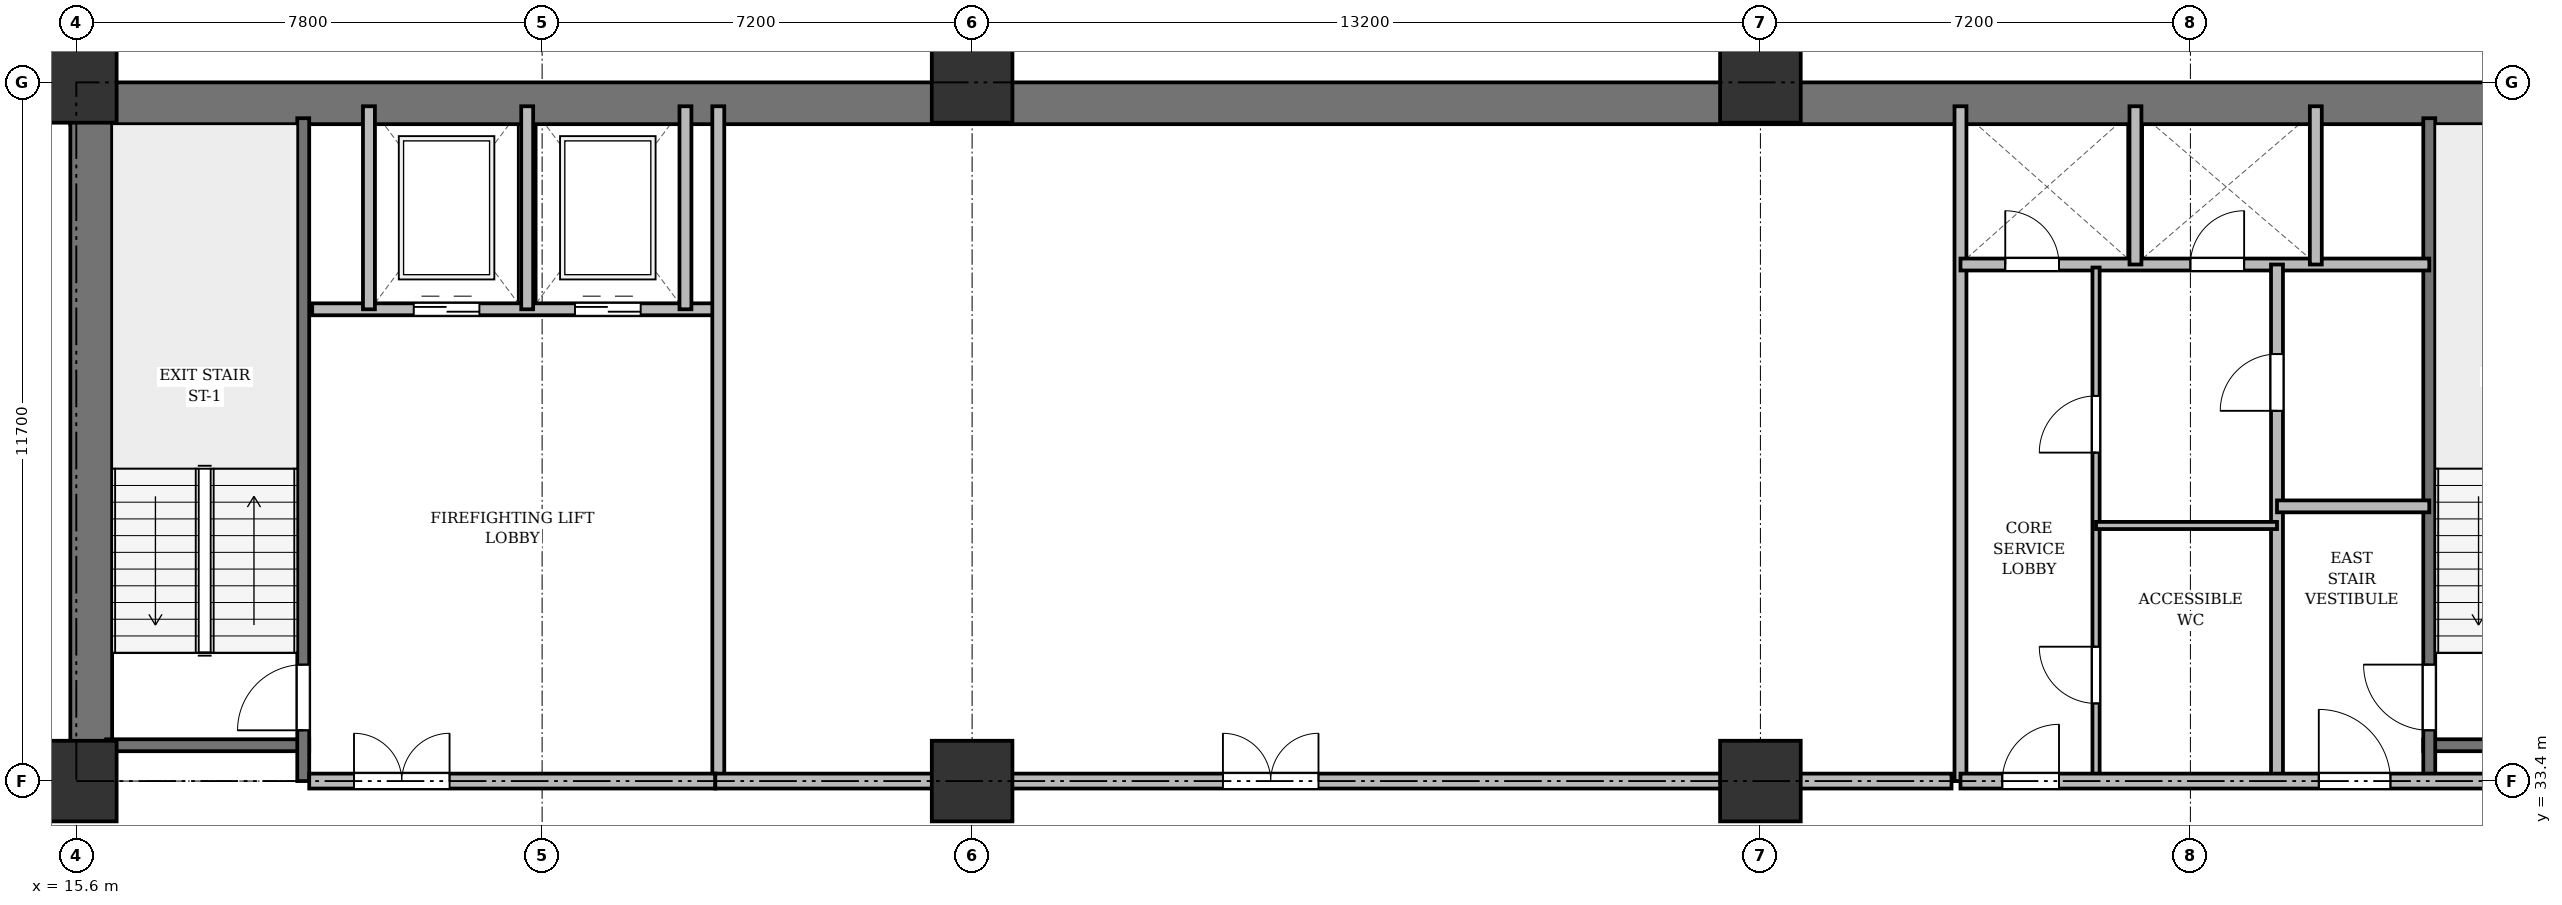
"""IFC4 building model, lengths in metres.
Left out: names, types, materials, properties, quantities, classifications, styles, units other than length and angle.
Written with IfcOpenShell. Run it as: python <this file> out.ifc"""

import sys

from ifc_helpers import new_model, si_unit, direction, frame, frame_2d, origin, origin_2d, place, context, subcontext, project, spatial, rectangle, extrude, source, transform, mapped, element, fill, save


model = new_model("IFC4")
c1 = context("Model", 3, precision=1e-05, world=origin(), true_north=direction((0.0, 1.0)))
c2 = subcontext(c1, "Body", "Model", "MODEL_VIEW")
j1 = project(units=[si_unit("LENGTHUNIT", "METRE"), si_unit("PLANEANGLEUNIT", "RADIAN")], contexts=[c1])
p1 = place(None, origin())
s1 = spatial("IfcSite", under=j1, at=p1, CompositionType="ELEMENT")
p2 = place(p1, origin())
s2 = spatial("IfcBuilding", under=s1, at=p2, CompositionType="ELEMENT")
p3 = place(p2, frame((0.0, 0.0, -4.3)))
s3 = spatial("IfcBuildingStorey", under=s2, at=p3, CompositionType="ELEMENT", Elevation=-4.3)
m1 = source(origin(), c2, "Body", "SweptSolid", [
    extrude(rectangle(XDim=1.35, YDim=1.35, at=origin_2d()), origin(), (0.0, 0.0, 1.0), 4.3),
])
for number, where, z_axis, x_axis in (
    (1, (15.6, 33.4, 0.0), (0.0, 0.0, 1.0), (1.0, 0.0, 0.0)),
    (2, (15.6, 45.1, 0.0), (0.0, 0.0, 1.0), (1.0, 0.0, 0.0)),
    (3, (30.6, 33.4, 0.0), (0.0, 0.0, 1.0), (1.0, 0.0, 0.0)),
    (4, (30.6, 45.1, 0.0), (0.0, 0.0, 1.0), (1.0, 0.0, 0.0)),
    (5, (43.8, 33.4, 0.0), (0.0, 0.0, 1.0), (1.0, 0.0, 0.0)),
    (6, (43.8, 45.1, 0.0), (0.0, 0.0, 1.0), (1.0, 0.0, 0.0)),
):
    element("IfcColumn", number, at=place(p3, frame(where, z_axis=z_axis, x_axis=x_axis)), inside=s3, PredefinedType="COLUMN", context=c2, shape_type="MappedRepresentation", body=[
        mapped(m1, transform((0.0, 0.0, 0.0), x_axis=(1.0, 0.0, 0.0), y_axis=(0.0, 1.0, 0.0), z_axis=(0.0, 0.0, 1.0), scale=1.0)),
    ])
p4 = place(p3, frame((15.5, 44.75, 0.0), z_axis=(0.0, 0.0, 1.0), x_axis=(1.0, 0.0, 0.0)))
e7 = element("IfcWall", 7, at=p4, inside=s3, PredefinedType="SHEAR", context=c2, shape_type="SweptSolid", body=[
    extrude(rectangle(XDim=43.4, YDim=0.7, at=frame_2d((21.7, 0.0))), origin(), (0.0, 0.0, 1.0), 3.94),
])
p5 = place(p3, frame((15.85, 33.4, 0.0), z_axis=(0.0, 0.0, 1.0), x_axis=(0.0, 1.0, 0.0)))
e8 = element("IfcWall", 8, at=p5, inside=s3, PredefinedType="SHEAR", context=c2, shape_type="SweptSolid", body=[
    extrude(rectangle(XDim=11.7, YDim=0.7, at=frame_2d((5.85, 0.0))), origin(), (0.0, 0.0, 1.0), 3.94),
])
p6 = place(p3, frame((16.1, 34.0, 0.0), z_axis=(0.0, 0.0, 1.0), x_axis=(1.0, 0.0, 0.0)))
e9 = element("IfcWall", 9, at=p6, inside=s3, PredefinedType="SHEAR", context=c2, shape_type="SweptSolid", body=[
    extrude(rectangle(XDim=3.4, YDim=0.2, at=frame_2d((1.7, 0.0))), origin(), (0.0, 0.0, 1.0), 3.94),
])
p7 = place(p3, frame((19.4, 33.4, 0.0), z_axis=(0.0, 0.0, 1.0), x_axis=(0.0, 1.0, 0.0)))
e10 = element("IfcWall", 10, at=p7, inside=s3, PredefinedType="SHEAR", context=c2, shape_type="SweptSolid", body=[
    extrude(rectangle(XDim=11.1, YDim=0.2, at=frame_2d((5.55, 0.0))), origin(), (0.0, 0.0, 1.0), 3.94),
])
p8 = place(p7, frame((0.85, 0.0, 0.0)))
e11 = element("IfcOpeningElement", 11, at=p8, cuts=e10, PredefinedType="OPENING", context=c2, shape_type="SweptSolid", body=[
    extrude(rectangle(XDim=1.1, YDim=2.15, at=frame_2d((0.55, 1.075))), frame((0.0, 0.11, 0.0), z_axis=(0.0, -1.0, 0.0), x_axis=(1.0, 0.0, 0.0)), (0.0, 0.0, 1.0), 0.22),
])
p9 = place(p3, frame((54.9, 34.0, 0.0), z_axis=(0.0, 0.0, 1.0), x_axis=(1.0, 0.0, 0.0)))
e12 = element("IfcWall", 12, at=p9, inside=s3, PredefinedType="SHEAR", context=c2, shape_type="SweptSolid", body=[
    extrude(rectangle(XDim=3.4, YDim=0.2, at=frame_2d((1.7, 0.0))), origin(), (0.0, 0.0, 1.0), 3.94),
])
p10 = place(p3, frame((55.0, 33.4, 0.0), z_axis=(0.0, 0.0, 1.0), x_axis=(0.0, 1.0, 0.0)))
e13 = element("IfcWall", 13, at=p10, inside=s3, PredefinedType="SHEAR", context=c2, shape_type="SweptSolid", body=[
    extrude(rectangle(XDim=11.1, YDim=0.2, at=frame_2d((5.55, 0.0))), origin(), (0.0, 0.0, 1.0), 3.94),
])
p11 = place(p10, frame((0.85, 0.0, 0.0)))
e14 = element("IfcOpeningElement", 14, at=p11, cuts=e13, PredefinedType="OPENING", context=c2, shape_type="SweptSolid", body=[
    extrude(rectangle(XDim=1.1, YDim=2.15, at=frame_2d((0.55, 1.075))), frame((0.0, 0.11, 0.0), z_axis=(0.0, -1.0, 0.0), x_axis=(1.0, 0.0, 0.0)), (0.0, 0.0, 1.0), 0.22),
])
p12 = place(p3, frame((19.55, 41.3, 0.0), z_axis=(0.0, 0.0, 1.0), x_axis=(1.0, 0.0, 0.0)))
e15 = element("IfcWall", 15, at=p12, inside=s3, PredefinedType="SOLIDWALL", context=c2, shape_type="SweptSolid", body=[
    extrude(rectangle(XDim=6.75, YDim=0.2, at=frame_2d((3.375, 0.0))), origin(), (0.0, 0.0, 1.0), 3.94),
])
p13 = place(p12, frame((1.7, 0.0, 0.0)))
e16 = element("IfcOpeningElement", 16, at=p13, cuts=e15, PredefinedType="OPENING", context=c2, shape_type="SweptSolid", body=[
    extrude(rectangle(XDim=1.1, YDim=2.15, at=frame_2d((0.55, 1.075))), frame((0.0, 0.11, 0.0), z_axis=(0.0, -1.0, 0.0), x_axis=(1.0, 0.0, 0.0)), (0.0, 0.0, 1.0), 0.22),
])
p14 = place(p12, frame((4.4, 0.0, 0.0)))
e17 = element("IfcOpeningElement", 17, at=p14, cuts=e15, PredefinedType="OPENING", context=c2, shape_type="SweptSolid", body=[
    extrude(rectangle(XDim=1.1, YDim=2.15, at=frame_2d((0.55, 1.075))), frame((0.0, 0.11, 0.0), z_axis=(0.0, -1.0, 0.0), x_axis=(1.0, 0.0, 0.0)), (0.0, 0.0, 1.0), 0.22),
])
for number, where, z_axis, x_axis in (
    (18, (20.5, 41.3, 0.0), (0.0, 0.0, 1.0), (0.0, 1.0, 0.0)),
    (19, (23.15, 41.3, 0.0), (0.0, 0.0, 1.0), (0.0, 1.0, 0.0)),
    (20, (25.8, 41.3, 0.0), (0.0, 0.0, 1.0), (0.0, 1.0, 0.0)),
):
    element("IfcWall", number, at=place(p3, frame(where, z_axis=z_axis, x_axis=x_axis)), inside=s3, PredefinedType="SOLIDWALL", context=c2, shape_type="SweptSolid", body=[
        extrude(rectangle(XDim=3.4, YDim=0.2, at=frame_2d((1.7, 0.0))), origin(), (0.0, 0.0, 1.0), 3.94),
    ])
p15 = place(p3, frame((26.35, 33.4, 0.0), z_axis=(0.0, 0.0, 1.0), x_axis=(0.0, 1.0, 0.0)))
e21 = element("IfcWall", 21, at=p15, inside=s3, PredefinedType="SOLIDWALL", context=c2, shape_type="SweptSolid", body=[
    extrude(rectangle(XDim=11.3, YDim=0.2, at=frame_2d((5.65, 0.0))), origin(), (0.0, 0.0, 1.0), 3.24),
])
p16 = place(p3, frame((19.5, 33.4, 0.0), z_axis=(0.0, 0.0, 1.0), x_axis=(1.0, 0.0, 0.0)))
e22 = element("IfcWall", 22, at=p16, inside=s3, PredefinedType="PARTITIONING", context=c2, shape_type="SweptSolid", body=[
    extrude(rectangle(XDim=6.8, YDim=0.25, at=frame_2d((3.4, 0.0))), origin(), (0.0, 0.0, 1.0), 3.24),
])
p17 = place(p16, frame((0.75, 0.0, 0.0)))
e23 = element("IfcOpeningElement", 23, at=p17, cuts=e22, PredefinedType="OPENING", context=c2, shape_type="SweptSolid", body=[
    extrude(rectangle(XDim=1.6, YDim=2.2, at=frame_2d((0.8, 1.1))), frame((0.0, 0.135, 0.0), z_axis=(0.0, -1.0, 0.0), x_axis=(1.0, 0.0, 0.0)), (0.0, 0.0, 1.0), 0.27),
])
p18 = place(p3, frame((47.15, 33.4, 0.0), z_axis=(0.0, 0.0, 1.0), x_axis=(0.0, 1.0, 0.0)))
e24 = element("IfcWall", 24, at=p18, inside=s3, PredefinedType="SOLIDWALL", context=c2, shape_type="SweptSolid", body=[
    extrude(rectangle(XDim=11.3, YDim=0.2, at=frame_2d((5.65, 0.0))), origin(), (0.0, 0.0, 1.0), 3.24),
])
p19 = place(p3, frame((26.3, 33.4, 0.0), z_axis=(0.0, 0.0, 1.0), x_axis=(1.0, 0.0, 0.0)))
e25 = element("IfcWall", 25, at=p19, inside=s3, PredefinedType="PARTITIONING", context=c2, shape_type="SweptSolid", body=[
    extrude(rectangle(XDim=20.7, YDim=0.25, at=frame_2d((10.35, 0.0))), origin(), (0.0, 0.0, 1.0), 3.24),
])
p20 = place(p19, frame((8.5, 0.0, 0.0)))
e26 = element("IfcOpeningElement", 26, at=p20, cuts=e25, PredefinedType="OPENING", context=c2, shape_type="SweptSolid", body=[
    extrude(rectangle(XDim=1.6, YDim=2.2, at=frame_2d((0.8, 1.1))), frame((0.0, 0.135, 0.0), z_axis=(0.0, -1.0, 0.0), x_axis=(1.0, 0.0, 0.0)), (0.0, 0.0, 1.0), 0.27),
])
p21 = place(p3, frame((47.15, 42.05, 0.0), z_axis=(0.0, 0.0, 1.0), x_axis=(1.0, 0.0, 0.0)))
e27 = element("IfcWall", 27, at=p21, inside=s3, PredefinedType="SOLIDWALL", context=c2, shape_type="SweptSolid", body=[
    extrude(rectangle(XDim=7.85, YDim=0.2, at=frame_2d((3.925, 0.0))), origin(), (0.0, 0.0, 1.0), 3.94),
])
p22 = place(p21, frame((0.75, 0.0, 0.0)))
e28 = element("IfcOpeningElement", 28, at=p22, cuts=e27, PredefinedType="OPENING", context=c2, shape_type="SweptSolid", body=[
    extrude(rectangle(XDim=0.9, YDim=2.1, at=frame_2d((0.45, 1.05))), frame((0.0, 0.11, 0.0), z_axis=(0.0, -1.0, 0.0), x_axis=(1.0, 0.0, 0.0)), (0.0, 0.0, 1.0), 0.22),
])
p23 = place(p21, frame((3.85, 0.0, 0.0)))
e29 = element("IfcOpeningElement", 29, at=p23, cuts=e27, PredefinedType="OPENING", context=c2, shape_type="SweptSolid", body=[
    extrude(rectangle(XDim=0.9, YDim=2.1, at=frame_2d((0.45, 1.05))), frame((0.0, 0.11, 0.0), z_axis=(0.0, -1.0, 0.0), x_axis=(1.0, 0.0, 0.0)), (0.0, 0.0, 1.0), 0.22),
])
for number, where, z_axis, x_axis in (
    (30, (50.08, 42.05, 0.0), (0.0, 0.0, 1.0), (0.0, 1.0, 0.0)),
    (31, (53.1, 42.05, 0.0), (0.0, 0.0, 1.0), (0.0, 1.0, 0.0)),
):
    element("IfcWall", number, at=place(p3, frame(where, z_axis=z_axis, x_axis=x_axis)), inside=s3, PredefinedType="SOLIDWALL", context=c2, shape_type="SweptSolid", body=[
        extrude(rectangle(XDim=2.65, YDim=0.2, at=frame_2d((1.325, 0.0))), origin(), (0.0, 0.0, 1.0), 3.94),
    ])
p24 = place(p3, frame((52.45, 33.4, 0.0), z_axis=(0.0, 0.0, 1.0), x_axis=(0.0, 1.0, 0.0)))
e32 = element("IfcWall", 32, at=p24, inside=s3, PredefinedType="PARTITIONING", context=c2, shape_type="SweptSolid", body=[
    extrude(rectangle(XDim=8.65, YDim=0.2, at=frame_2d((4.325, 0.0))), origin(), (0.0, 0.0, 1.0), 3.24),
])
p25 = place(p24, frame((6.2, 0.0, 0.0)))
e33 = element("IfcOpeningElement", 33, at=p25, cuts=e32, PredefinedType="OPENING", context=c2, shape_type="SweptSolid", body=[
    extrude(rectangle(XDim=0.95, YDim=2.15, at=frame_2d((0.475, 1.075))), frame((0.0, 0.11, 0.0), z_axis=(0.0, -1.0, 0.0), x_axis=(1.0, 0.0, 0.0)), (0.0, 0.0, 1.0), 0.22),
])
p26 = place(p3, frame((52.45, 38.0, 0.0), z_axis=(0.0, 0.0, 1.0), x_axis=(1.0, 0.0, 0.0)))
e34 = element("IfcWall", 34, at=p26, inside=s3, PredefinedType="PARTITIONING", context=c2, shape_type="SweptSolid", body=[
    extrude(rectangle(XDim=2.55, YDim=0.2, at=frame_2d((1.275, 0.0))), origin(), (0.0, 0.0, 1.0), 3.94),
])
p27 = place(p3, frame((49.42, 33.4, 0.0), z_axis=(0.0, 0.0, 1.0), x_axis=(0.0, 1.0, 0.0)))
e35 = element("IfcWall", 35, at=p27, inside=s3, PredefinedType="PARTITIONING", context=c2, shape_type="SweptSolid", body=[
    extrude(rectangle(XDim=8.6, YDim=0.12, at=frame_2d((4.3, 0.0))), origin(), (0.0, 0.0, 1.0), 3.24),
])
p28 = place(p27, frame((1.3, 0.0, 0.0)))
e36 = element("IfcOpeningElement", 36, at=p28, cuts=e35, PredefinedType="OPENING", context=c2, shape_type="SweptSolid", body=[
    extrude(rectangle(XDim=0.95, YDim=2.15, at=frame_2d((0.475, 1.075))), frame((0.0, 0.07, 0.0), z_axis=(0.0, -1.0, 0.0), x_axis=(1.0, 0.0, 0.0)), (0.0, 0.0, 1.0), 0.14),
])
p29 = place(p27, frame((5.5, 0.0, 0.0)))
e37 = element("IfcOpeningElement", 37, at=p29, cuts=e35, PredefinedType="OPENING", context=c2, shape_type="SweptSolid", body=[
    extrude(rectangle(XDim=0.95, YDim=2.15, at=frame_2d((0.475, 1.075))), frame((0.0, 0.07, 0.0), z_axis=(0.0, -1.0, 0.0), x_axis=(1.0, 0.0, 0.0)), (0.0, 0.0, 1.0), 0.14),
])
p30 = place(p3, frame((49.42, 37.68, 0.0), z_axis=(0.0, 0.0, 1.0), x_axis=(1.0, 0.0, 0.0)))
e38 = element("IfcWall", 38, at=p30, inside=s3, PredefinedType="PARTITIONING", context=c2, shape_type="SweptSolid", body=[
    extrude(rectangle(XDim=3.03, YDim=0.12, at=frame_2d((1.515, 0.0))), origin(), (0.0, 0.0, 1.0), 3.94),
])
p31 = place(p3, frame((47.15, 33.4, 0.0), z_axis=(0.0, 0.0, 1.0), x_axis=(1.0, 0.0, 0.0)))
e39 = element("IfcWall", 39, at=p31, inside=s3, PredefinedType="PARTITIONING", context=c2, shape_type="SweptSolid", body=[
    extrude(rectangle(XDim=11.15, YDim=0.25, at=frame_2d((5.575, 0.0))), origin(), (0.0, 0.0, 1.0), 3.24),
])
p32 = place(p31, frame((0.7, 0.0, 0.0)))
e40 = element("IfcOpeningElement", 40, at=p32, cuts=e39, PredefinedType="OPENING", context=c2, shape_type="SweptSolid", body=[
    extrude(rectangle(XDim=0.95, YDim=2.15, at=frame_2d((0.475, 1.075))), frame((0.0, 0.135, 0.0), z_axis=(0.0, -1.0, 0.0), x_axis=(1.0, 0.0, 0.0)), (0.0, 0.0, 1.0), 0.27),
])
p33 = place(p31, frame((6.0, 0.0, 0.0)))
e41 = element("IfcOpeningElement", 41, at=p33, cuts=e39, PredefinedType="OPENING", context=c2, shape_type="SweptSolid", body=[
    extrude(rectangle(XDim=1.2, YDim=2.15, at=frame_2d((0.6, 1.075))), frame((0.0, 0.135, 0.0), z_axis=(0.0, -1.0, 0.0), x_axis=(1.0, 0.0, 0.0)), (0.0, 0.0, 1.0), 0.27),
])
m2 = source(origin(), c2, "Body", "SweptSolid", [
    extrude(rectangle(XDim=1.1, YDim=2.15, at=frame_2d((0.55, 1.075))), frame((0.0, 0.025, 0.0), z_axis=(0.0, -1.0, 0.0), x_axis=(1.0, 0.0, 0.0)), (0.0, 0.0, 1.0), 0.05),
])
p34 = place(p8, origin())
e42 = element("IfcDoor", 42, at=p34, inside=s3, OperationType="SINGLE_SWING_LEFT", PredefinedType="DOOR", context=c2, shape_type="MappedRepresentation", body=[
    mapped(m2, transform((0.0, 0.0, 0.0), x_axis=(1.0, 0.0, 0.0), y_axis=(0.0, 1.0, 0.0), z_axis=(0.0, 0.0, 1.0), scale=1.0)),
])
fill(e11, e42)
p35 = place(p11, origin())
e43 = element("IfcDoor", 43, at=p35, inside=s3, OperationType="SINGLE_SWING_RIGHT", PredefinedType="DOOR", context=c2, shape_type="MappedRepresentation", body=[
    mapped(m2, transform((0.0, 0.0, 0.0), x_axis=(1.0, 0.0, 0.0), y_axis=(0.0, 1.0, 0.0), z_axis=(0.0, 0.0, 1.0), scale=1.0)),
])
fill(e14, e43)
p36 = place(p13, origin())
e44 = element("IfcDoor", 44, at=p36, inside=s3, OperationType="DOUBLE_DOOR_SLIDING", PredefinedType="DOOR", context=c2, shape_type="MappedRepresentation", body=[
    mapped(m2, transform((0.0, 0.0, 0.0), x_axis=(1.0, 0.0, 0.0), y_axis=(0.0, 1.0, 0.0), z_axis=(0.0, 0.0, 1.0), scale=1.0)),
])
fill(e16, e44)
p37 = place(p14, origin())
e45 = element("IfcDoor", 45, at=p37, inside=s3, OperationType="DOUBLE_DOOR_SLIDING", PredefinedType="DOOR", context=c2, shape_type="MappedRepresentation", body=[
    mapped(m2, transform((0.0, 0.0, 0.0), x_axis=(1.0, 0.0, 0.0), y_axis=(0.0, 1.0, 0.0), z_axis=(0.0, 0.0, 1.0), scale=1.0)),
])
fill(e17, e45)
m3 = source(origin(), c2, "Body", "SweptSolid", [
    extrude(rectangle(XDim=1.6, YDim=2.2, at=frame_2d((0.8, 1.1))), frame((0.0, 0.025, 0.0), z_axis=(0.0, -1.0, 0.0), x_axis=(1.0, 0.0, 0.0)), (0.0, 0.0, 1.0), 0.05),
])
p38 = place(p17, origin())
e46 = element("IfcDoor", 46, at=p38, inside=s3, OperationType="DOUBLE_DOOR_SINGLE_SWING", PredefinedType="DOOR", context=c2, shape_type="MappedRepresentation", body=[
    mapped(m3, transform((0.0, 0.0, 0.0), x_axis=(1.0, 0.0, 0.0), y_axis=(0.0, 1.0, 0.0), z_axis=(0.0, 0.0, 1.0), scale=1.0)),
])
fill(e23, e46)
p39 = place(p20, origin())
e47 = element("IfcDoor", 47, at=p39, inside=s3, OperationType="DOUBLE_DOOR_SINGLE_SWING", PredefinedType="DOOR", context=c2, shape_type="MappedRepresentation", body=[
    mapped(m3, transform((0.0, 0.0, 0.0), x_axis=(1.0, 0.0, 0.0), y_axis=(0.0, 1.0, 0.0), z_axis=(0.0, 0.0, 1.0), scale=1.0)),
])
fill(e26, e47)
m4 = source(origin(), c2, "Body", "SweptSolid", [
    extrude(rectangle(XDim=0.9, YDim=2.1, at=frame_2d((0.45, 1.05))), frame((0.0, 0.025, 0.0), z_axis=(0.0, -1.0, 0.0), x_axis=(1.0, 0.0, 0.0)), (0.0, 0.0, 1.0), 0.05),
])
p40 = place(p22, origin())
e48 = element("IfcDoor", 48, at=p40, inside=s3, OperationType="SINGLE_SWING_LEFT", PredefinedType="DOOR", context=c2, shape_type="MappedRepresentation", body=[
    mapped(m4, transform((0.0, 0.0, 0.0), x_axis=(1.0, 0.0, 0.0), y_axis=(0.0, 1.0, 0.0), z_axis=(0.0, 0.0, 1.0), scale=1.0)),
])
fill(e28, e48)
p41 = place(p23, origin())
e49 = element("IfcDoor", 49, at=p41, inside=s3, OperationType="SINGLE_SWING_RIGHT", PredefinedType="DOOR", context=c2, shape_type="MappedRepresentation", body=[
    mapped(m4, transform((0.0, 0.0, 0.0), x_axis=(1.0, 0.0, 0.0), y_axis=(0.0, 1.0, 0.0), z_axis=(0.0, 0.0, 1.0), scale=1.0)),
])
fill(e29, e49)
m5 = source(origin(), c2, "Body", "SweptSolid", [
    extrude(rectangle(XDim=0.95, YDim=2.15, at=frame_2d((0.475, 1.075))), frame((0.0, 0.025, 0.0), z_axis=(0.0, -1.0, 0.0), x_axis=(1.0, 0.0, 0.0)), (0.0, 0.0, 1.0), 0.05),
])
p42 = place(p25, origin())
e50 = element("IfcDoor", 50, at=p42, inside=s3, OperationType="SINGLE_SWING_LEFT", PredefinedType="DOOR", context=c2, shape_type="MappedRepresentation", body=[
    mapped(m5, transform((0.0, 0.0, 0.0), x_axis=(1.0, 0.0, 0.0), y_axis=(0.0, 1.0, 0.0), z_axis=(0.0, 0.0, 1.0), scale=1.0)),
])
fill(e33, e50)
p43 = place(p28, origin())
e51 = element("IfcDoor", 51, at=p43, inside=s3, OperationType="SINGLE_SWING_RIGHT", PredefinedType="DOOR", context=c2, shape_type="MappedRepresentation", body=[
    mapped(m5, transform((0.0, 0.0, 0.0), x_axis=(1.0, 0.0, 0.0), y_axis=(0.0, 1.0, 0.0), z_axis=(0.0, 0.0, 1.0), scale=1.0)),
])
fill(e36, e51)
p44 = place(p29, origin())
e52 = element("IfcDoor", 52, at=p44, inside=s3, OperationType="SINGLE_SWING_LEFT", PredefinedType="DOOR", context=c2, shape_type="MappedRepresentation", body=[
    mapped(m5, transform((0.0, 0.0, 0.0), x_axis=(1.0, 0.0, 0.0), y_axis=(0.0, 1.0, 0.0), z_axis=(0.0, 0.0, 1.0), scale=1.0)),
])
fill(e37, e52)
p45 = place(p32, origin())
e53 = element("IfcDoor", 53, at=p45, inside=s3, OperationType="SINGLE_SWING_RIGHT", PredefinedType="DOOR", context=c2, shape_type="MappedRepresentation", body=[
    mapped(m5, transform((0.0, 0.0, 0.0), x_axis=(1.0, 0.0, 0.0), y_axis=(0.0, 1.0, 0.0), z_axis=(0.0, 0.0, 1.0), scale=1.0)),
])
fill(e40, e53)
m6 = source(origin(), c2, "Body", "SweptSolid", [
    extrude(rectangle(XDim=1.2, YDim=2.15, at=frame_2d((0.6, 1.075))), frame((0.0, 0.025, 0.0), z_axis=(0.0, -1.0, 0.0), x_axis=(1.0, 0.0, 0.0)), (0.0, 0.0, 1.0), 0.05),
])
p46 = place(p33, origin())
e54 = element("IfcDoor", 54, at=p46, inside=s3, OperationType="SINGLE_SWING_LEFT", PredefinedType="DOOR", context=c2, shape_type="MappedRepresentation", body=[
    mapped(m6, transform((0.0, 0.0, 0.0), x_axis=(1.0, 0.0, 0.0), y_axis=(0.0, 1.0, 0.0), z_axis=(0.0, 0.0, 1.0), scale=1.0)),
])
fill(e41, e54)
save(model, sys.argv[1])
